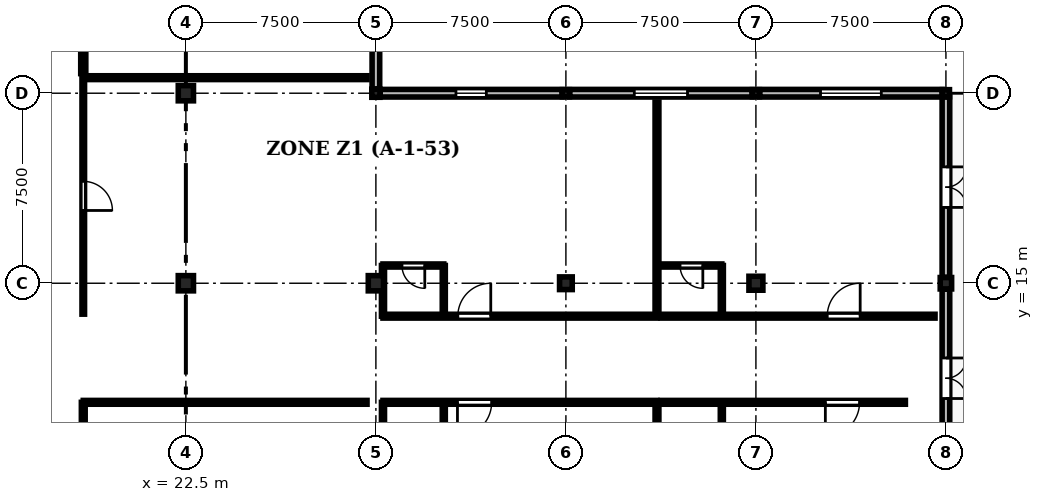
"""IFC4 building model, lengths in metres.
Left out: names, types, materials, properties, quantities, classifications, styles, units other than length and angle.
Written with IfcOpenShell. Run it as: python <this file> out.ifc"""

import sys

from ifc_helpers import new_model, si_unit, direction, frame, frame_2d, origin, origin_2d, place, context, subcontext, project, spatial, rectangle, circle, extrude, element, fill, save


model = new_model("IFC4")
c1 = context("Model", 3, precision=1e-05, world=origin(), true_north=direction((0.0, 1.0)))
c2 = subcontext(c1, "Body", "Model", "MODEL_VIEW")
j1 = project(units=[si_unit("LENGTHUNIT", "METRE"), si_unit("PLANEANGLEUNIT", "RADIAN")], contexts=[c1])
p1 = place(None, origin())
s1 = spatial("IfcSite", under=j1, at=p1, CompositionType="ELEMENT")
p2 = place(p1, origin())
s2 = spatial("IfcBuilding", under=s1, at=p2, CompositionType="ELEMENT")
p3 = place(p2, frame((0.0, 0.0, 21.9)))
s3 = spatial("IfcBuildingStorey", under=s2, at=p3, CompositionType="ELEMENT", Elevation=21.9)
p4 = place(p3, frame((22.5, 15.0, 0.0), z_axis=(0.0, 0.0, 1.0), x_axis=(1.0, 0.0, 0.0)))
e1 = element("IfcColumn", 1, at=p4, inside=s3, PredefinedType="COLUMN", context=c2, shape_type="SweptSolid", body=[
    extrude(rectangle(XDim=0.6, YDim=0.6, at=origin_2d()), origin(), (0.0, 0.0, 1.0), 4.05),
])
for number, where, z_axis, x_axis in (
    (2, (22.5, 22.5, 0.0), (0.0, 0.0, 1.0), (1.0, 0.0, 0.0)),
    (3, (30.0, 15.0, 0.0), (0.0, 0.0, 1.0), (1.0, 0.0, 0.0)),
):
    element("IfcColumn", number, at=place(p3, frame(where, z_axis=z_axis, x_axis=x_axis)), inside=s3, PredefinedType="COLUMN", context=c2, shape_type="SweptSolid", body=[
        extrude(circle(Radius=0.3, at=origin_2d()), origin(), (0.0, 0.0, 1.0), 4.05),
    ])
p5 = place(p3, frame((30.0, 22.5, 0.0), z_axis=(0.0, 0.0, 1.0), x_axis=(1.0, 0.0, 0.0)))
e4 = element("IfcColumn", 4, at=p5, inside=s3, PredefinedType="COLUMN", context=c2, shape_type="SweptSolid", body=[
    extrude(rectangle(XDim=0.32, YDim=0.32, at=origin_2d()), origin(), (0.0, 0.0, 1.0), 4.05),
])
p6 = place(p3, frame((37.5, 15.0, 0.0), z_axis=(0.0, 0.0, 1.0), x_axis=(1.0, 0.0, 0.0)))
e5 = element("IfcColumn", 5, at=p6, inside=s3, PredefinedType="COLUMN", context=c2, shape_type="SweptSolid", body=[
    extrude(rectangle(XDim=0.5, YDim=0.5, at=origin_2d()), origin(), (0.0, 0.0, 1.0), 4.05),
])
p7 = place(p3, frame((37.5, 22.5, 0.0), z_axis=(0.0, 0.0, 1.0), x_axis=(1.0, 0.0, 0.0)))
e6 = element("IfcColumn", 6, at=p7, inside=s3, PredefinedType="COLUMN", context=c2, shape_type="SweptSolid", body=[
    extrude(rectangle(XDim=0.28, YDim=0.28, at=origin_2d()), origin(), (0.0, 0.0, 1.0), 4.05),
])
p8 = place(p3, frame((45.0, 15.0, 0.0), z_axis=(0.0, 0.0, 1.0), x_axis=(1.0, 0.0, 0.0)))
e7 = element("IfcColumn", 7, at=p8, inside=s3, PredefinedType="COLUMN", context=c2, shape_type="SweptSolid", body=[
    extrude(rectangle(XDim=0.55, YDim=0.55, at=origin_2d()), origin(), (0.0, 0.0, 1.0), 4.05),
])
p9 = place(p3, frame((45.0, 22.5, 0.0), z_axis=(0.0, 0.0, 1.0), x_axis=(1.0, 0.0, 0.0)))
e8 = element("IfcColumn", 8, at=p9, inside=s3, PredefinedType="COLUMN", context=c2, shape_type="SweptSolid", body=[
    extrude(rectangle(XDim=0.28, YDim=0.28, at=origin_2d()), origin(), (0.0, 0.0, 1.0), 4.05),
])
p10 = place(p3, frame((52.5, 15.0, 0.0), z_axis=(0.0, 0.0, 1.0), x_axis=(1.0, 0.0, 0.0)))
e9 = element("IfcColumn", 9, at=p10, inside=s3, PredefinedType="COLUMN", context=c2, shape_type="SweptSolid", body=[
    extrude(rectangle(XDim=0.45, YDim=0.45, at=origin_2d()), origin(), (0.0, 0.0, 1.0), 4.05),
])
p11 = place(p3, frame((52.5, 22.5, 0.0), z_axis=(0.0, 0.0, 1.0), x_axis=(1.0, 0.0, 0.0)))
e10 = element("IfcColumn", 10, at=p11, inside=s3, PredefinedType="COLUMN", context=c2, shape_type="SweptSolid", body=[
    extrude(rectangle(XDim=0.28, YDim=0.28, at=origin_2d()), origin(), (0.0, 0.0, 1.0), 4.05),
])
p12 = place(p3, frame((30.0, 31.33, 0.0), z_axis=(0.0, 0.0, 1.0), x_axis=(0.0, -1.0, 0.0)))
e11 = element("IfcWall", 11, at=p12, inside=s3, PredefinedType="STANDARD", context=c2, shape_type="SweptSolid", body=[
    extrude(rectangle(XDim=8.66, YDim=0.3, at=frame_2d((4.33, 0.0))), origin(), (0.0, 0.0, 1.0), 3.22),
])
p13 = place(p12, frame((3.73, 0.0, 0.9)))
e12 = element("IfcOpeningElement", 12, at=p13, cuts=e11, PredefinedType="OPENING", context=c2, shape_type="SweptSolid", body=[
    extrude(rectangle(XDim=1.2, YDim=2.04, at=frame_2d((0.6, 1.02))), frame((0.0, 0.16, 0.0), z_axis=(0.0, -1.0, 0.0), x_axis=(1.0, 0.0, 0.0)), (0.0, 0.0, 1.0), 0.32),
])
p14 = place(p3, frame((30.17, 22.5, 0.0), z_axis=(0.0, 0.0, 1.0), x_axis=(1.0, 0.0, 0.0)))
e13 = element("IfcWall", 13, at=p14, inside=s3, PredefinedType="STANDARD", context=c2, shape_type="SweptSolid", body=[
    extrude(rectangle(XDim=7.18, YDim=0.3, at=frame_2d((3.59, 0.0))), origin(), (0.0, 0.0, 1.0), 3.17),
])
p15 = place(p14, frame((2.99, 0.0, 0.9)))
e14 = element("IfcOpeningElement", 14, at=p15, cuts=e13, PredefinedType="OPENING", context=c2, shape_type="SweptSolid", body=[
    extrude(rectangle(XDim=1.2, YDim=1.99, at=frame_2d((0.6, 0.995))), frame((0.0, 0.16, 0.0), z_axis=(0.0, -1.0, 0.0), x_axis=(1.0, 0.0, 0.0)), (0.0, 0.0, 1.0), 0.32),
])
p16 = place(p3, frame((37.65, 22.5, 0.0), z_axis=(0.0, 0.0, 1.0), x_axis=(1.0, 0.0, 0.0)))
e15 = element("IfcWall", 15, at=p16, inside=s3, PredefinedType="STANDARD", context=c2, shape_type="SweptSolid", body=[
    extrude(rectangle(XDim=7.2, YDim=0.3, at=frame_2d((3.6, 0.0))), origin(), (0.0, 0.0, 1.0), 3.17),
])
p17 = place(p16, frame((2.55, 0.0, 0.9)))
e16 = element("IfcOpeningElement", 16, at=p17, cuts=e15, PredefinedType="OPENING", context=c2, shape_type="SweptSolid", body=[
    extrude(rectangle(XDim=2.1, YDim=1.99, at=frame_2d((1.05, 0.995))), frame((0.0, 0.16, 0.0), z_axis=(0.0, -1.0, 0.0), x_axis=(1.0, 0.0, 0.0)), (0.0, 0.0, 1.0), 0.32),
])
p18 = place(p3, frame((52.5, 14.765, 0.0), z_axis=(0.0, 0.0, 1.0), x_axis=(0.0, -1.0, 0.0)))
e17 = element("IfcWall", 17, at=p18, inside=s3, PredefinedType="STANDARD", context=c2, shape_type="SweptSolid", body=[
    extrude(rectangle(XDim=7.03, YDim=0.3, at=frame_2d((3.515, 0.0))), origin(), (0.0, 0.0, 1.0), 3.17),
])
p19 = place(p18, frame((2.715, 0.0, 0.0)))
e18 = element("IfcOpeningElement", 18, at=p19, cuts=e17, PredefinedType="OPENING", context=c2, shape_type="SweptSolid", body=[
    extrude(rectangle(XDim=1.6, YDim=2.35, at=frame_2d((0.8, 1.175))), frame((0.0, 0.16, 0.0), z_axis=(0.0, -1.0, 0.0), x_axis=(1.0, 0.0, 0.0)), (0.0, 0.0, 1.0), 0.32),
])
p20 = place(p3, frame((45.15, 22.5, 0.0), z_axis=(0.0, 0.0, 1.0), x_axis=(1.0, 0.0, 0.0)))
e19 = element("IfcWall", 19, at=p20, inside=s3, PredefinedType="STANDARD", context=c2, shape_type="SweptSolid", body=[
    extrude(rectangle(XDim=7.2, YDim=0.3, at=frame_2d((3.6, 0.0))), origin(), (0.0, 0.0, 1.0), 3.17),
])
p21 = place(p20, frame((2.4, 0.0, 0.9)))
e20 = element("IfcOpeningElement", 20, at=p21, cuts=e19, PredefinedType="OPENING", context=c2, shape_type="SweptSolid", body=[
    extrude(rectangle(XDim=2.4, YDim=1.99, at=frame_2d((1.2, 0.995))), frame((0.0, 0.16, 0.0), z_axis=(0.0, -1.0, 0.0), x_axis=(1.0, 0.0, 0.0)), (0.0, 0.0, 1.0), 0.32),
])
p22 = place(p3, frame((52.5, 22.35, 0.0), z_axis=(0.0, 0.0, 1.0), x_axis=(0.0, -1.0, 0.0)))
e21 = element("IfcWall", 21, at=p22, inside=s3, PredefinedType="STANDARD", context=c2, shape_type="SweptSolid", body=[
    extrude(rectangle(XDim=7.115, YDim=0.3, at=frame_2d((3.558, 0.0))), origin(), (0.0, 0.0, 1.0), 3.17),
])
p23 = place(p22, frame((2.758, 0.0, 0.0)))
e22 = element("IfcOpeningElement", 22, at=p23, cuts=e21, PredefinedType="OPENING", context=c2, shape_type="SweptSolid", body=[
    extrude(rectangle(XDim=1.6, YDim=2.35, at=frame_2d((0.8, 1.175))), frame((0.0, 0.16, 0.0), z_axis=(0.0, -1.0, 0.0), x_axis=(1.0, 0.0, 0.0)), (0.0, 0.0, 1.0), 0.32),
])
p24 = place(p3, frame((18.45, 10.3, 0.0), z_axis=(0.0, 0.0, 1.0), x_axis=(0.0, -1.0, 0.0)))
e23 = element("IfcWall", 23, at=p24, inside=s3, PredefinedType="PARTITIONING", context=c2, shape_type="SweptSolid", body=[
    extrude(rectangle(XDim=9.95, YDim=0.15, at=frame_2d((4.975, 0.0))), origin(), (0.0, 0.0, 1.0), 3.755),
])
p25 = place(p24, frame((5.92, 0.0, 0.0)))
e24 = element("IfcOpeningElement", 24, at=p25, cuts=e23, PredefinedType="OPENING", context=c2, shape_type="SweptSolid", body=[
    extrude(rectangle(XDim=1.35, YDim=2.25, at=frame_2d((0.675, 1.125))), frame((0.0, 0.085, 0.0), z_axis=(0.0, -1.0, 0.0), x_axis=(1.0, 0.0, 0.0)), (0.0, 0.0, 1.0), 0.17),
])
p26 = place(p3, frame((18.45, 23.114, 0.0), z_axis=(0.0, 0.0, 1.0), x_axis=(0.0, -1.0, 0.0)))
e25 = element("IfcWall", 25, at=p26, inside=s3, PredefinedType="PARTITIONING", context=c2, shape_type="SweptSolid", body=[
    extrude(rectangle(XDim=9.334, YDim=0.1, at=frame_2d((4.667, 0.0))), origin(), (0.0, 0.0, 1.0), 3.355),
])
p27 = place(p26, frame((4.092, 0.0, 0.0)))
e26 = element("IfcOpeningElement", 26, at=p27, cuts=e25, PredefinedType="OPENING", context=c2, shape_type="SweptSolid", body=[
    extrude(rectangle(XDim=1.15, YDim=2.2, at=frame_2d((0.575, 1.1))), frame((0.0, 0.06, 0.0), z_axis=(0.0, -1.0, 0.0), x_axis=(1.0, 0.0, 0.0)), (0.0, 0.0, 1.0), 0.12),
])
p28 = place(p3, frame((18.45, 32.607, 0.0), z_axis=(0.0, 0.0, 1.0), x_axis=(0.0, -1.0, 0.0)))
e27 = element("IfcWall", 27, at=p28, inside=s3, PredefinedType="STANDARD", context=c2, shape_type="SweptSolid", body=[
    extrude(rectangle(XDim=9.334, YDim=0.2, at=frame_2d((4.667, 0.0))), origin(), (0.0, 0.0, 1.0), 3.355),
])
p29 = place(p28, frame((4.86, 0.0, 0.0)))
e28 = element("IfcOpeningElement", 28, at=p29, cuts=e27, PredefinedType="OPENING", context=c2, shape_type="SweptSolid", body=[
    extrude(rectangle(XDim=1.15, YDim=2.2, at=frame_2d((0.575, 1.1))), frame((0.0, 0.11, 0.0), z_axis=(0.0, -1.0, 0.0), x_axis=(1.0, 0.0, 0.0)), (0.0, 0.0, 1.0), 0.22),
])
p30 = place(p3, frame((41.095, 10.3, 0.0), z_axis=(0.0, 0.0, 1.0), x_axis=(-1.0, 0.0, 0.0)))
e29 = element("IfcWall", 29, at=p30, inside=s3, PredefinedType="PARTITIONING", context=c2, shape_type="SweptSolid", body=[
    extrude(rectangle(XDim=10.815, YDim=0.15, at=frame_2d((5.407, 0.0))), origin(), (0.0, 0.0, 1.0), 3.755),
])
p31 = place(p30, frame((6.525, 0.0, 0.0)))
e30 = element("IfcOpeningElement", 30, at=p31, cuts=e29, PredefinedType="OPENING", context=c2, shape_type="SweptSolid", body=[
    extrude(rectangle(XDim=1.35, YDim=2.25, at=frame_2d((0.675, 1.125))), frame((0.0, 0.085, 0.0), z_axis=(0.0, -1.0, 0.0), x_axis=(1.0, 0.0, 0.0)), (0.0, 0.0, 1.0), 0.17),
])
p32 = place(p3, frame((32.68, 8.3, 0.0), z_axis=(0.0, 0.0, 1.0), x_axis=(0.0, 1.0, 0.0)))
e31 = element("IfcWall", 31, at=p32, inside=s3, PredefinedType="PARTITIONING", context=c2, shape_type="SweptSolid", body=[
    extrude(rectangle(XDim=2.0, YDim=0.12, at=frame_2d((1.0, 0.0))), origin(), (0.0, 0.0, 1.0), 3.755),
])
p33 = place(p3, frame((30.28, 13.7, 0.0), z_axis=(0.0, 0.0, 1.0), x_axis=(1.0, 0.0, 0.0)))
e32 = element("IfcWall", 32, at=p33, inside=s3, PredefinedType="PARTITIONING", context=c2, shape_type="SweptSolid", body=[
    extrude(rectangle(XDim=10.815, YDim=0.15, at=frame_2d((5.407, 0.0))), origin(), (0.0, 0.0, 1.0), 3.755),
])
p34 = place(p33, frame((2.955, 0.0, 0.0)))
e33 = element("IfcOpeningElement", 33, at=p34, cuts=e32, PredefinedType="OPENING", context=c2, shape_type="SweptSolid", body=[
    extrude(rectangle(XDim=1.3, YDim=2.2, at=frame_2d((0.65, 1.1))), frame((0.0, 0.085, 0.0), z_axis=(0.0, -1.0, 0.0), x_axis=(1.0, 0.0, 0.0)), (0.0, 0.0, 1.0), 0.17),
])
p35 = place(p3, frame((32.68, 15.7, 0.0), z_axis=(0.0, 0.0, 1.0), x_axis=(-1.0, 0.0, 0.0)))
e34 = element("IfcWall", 34, at=p35, inside=s3, PredefinedType="PARTITIONING", context=c2, shape_type="SweptSolid", body=[
    extrude(rectangle(XDim=2.4, YDim=0.12, at=frame_2d((1.2, 0.0))), origin(), (0.0, 0.0, 1.0), 3.755),
])
p36 = place(p35, frame((0.75, 0.0, 0.0)))
e35 = element("IfcOpeningElement", 35, at=p36, cuts=e34, PredefinedType="OPENING", context=c2, shape_type="SweptSolid", body=[
    extrude(rectangle(XDim=0.9, YDim=2.1, at=frame_2d((0.45, 1.05))), frame((0.0, 0.07, 0.0), z_axis=(0.0, -1.0, 0.0), x_axis=(1.0, 0.0, 0.0)), (0.0, 0.0, 1.0), 0.14),
])
p37 = place(p3, frame((32.68, 13.7, 0.0), z_axis=(0.0, 0.0, 1.0), x_axis=(0.0, 1.0, 0.0)))
e36 = element("IfcWall", 36, at=p37, inside=s3, PredefinedType="PARTITIONING", context=c2, shape_type="SweptSolid", body=[
    extrude(rectangle(XDim=2.0, YDim=0.12, at=frame_2d((1.0, 0.0))), origin(), (0.0, 0.0, 1.0), 3.755),
])
p38 = place(p3, frame((50.9, 10.3, 0.0), z_axis=(0.0, 0.0, 1.0), x_axis=(-1.0, 0.0, 0.0)))
e37 = element("IfcWall", 37, at=p38, inside=s3, PredefinedType="PARTITIONING", context=c2, shape_type="SweptSolid", body=[
    extrude(rectangle(XDim=9.645, YDim=0.15, at=frame_2d((4.823, 0.0))), origin(), (0.0, 0.0, 1.0), 3.755),
])
p39 = place(p38, frame((1.809, 0.0, 0.0)))
e38 = element("IfcOpeningElement", 38, at=p39, cuts=e37, PredefinedType="OPENING", context=c2, shape_type="SweptSolid", body=[
    extrude(rectangle(XDim=1.35, YDim=2.25, at=frame_2d((0.675, 1.125))), frame((0.0, 0.085, 0.0), z_axis=(0.0, -1.0, 0.0), x_axis=(1.0, 0.0, 0.0)), (0.0, 0.0, 1.0), 0.17),
])
p40 = place(p3, frame((43.655, 8.3, 0.0), z_axis=(0.0, 0.0, 1.0), x_axis=(0.0, 1.0, 0.0)))
e39 = element("IfcWall", 39, at=p40, inside=s3, PredefinedType="PARTITIONING", context=c2, shape_type="SweptSolid", body=[
    extrude(rectangle(XDim=2.0, YDim=0.12, at=frame_2d((1.0, 0.0))), origin(), (0.0, 0.0, 1.0), 3.755),
])
p41 = place(p3, frame((41.255, 13.7, 0.0), z_axis=(0.0, 0.0, 1.0), x_axis=(1.0, 0.0, 0.0)))
e40 = element("IfcWall", 40, at=p41, inside=s3, PredefinedType="PARTITIONING", context=c2, shape_type="SweptSolid", body=[
    extrude(rectangle(XDim=10.815, YDim=0.15, at=frame_2d((5.408, 0.0))), origin(), (0.0, 0.0, 1.0), 3.755),
])
p42 = place(p41, frame((6.561, 0.0, 0.0)))
e41 = element("IfcOpeningElement", 41, at=p42, cuts=e40, PredefinedType="OPENING", context=c2, shape_type="SweptSolid", body=[
    extrude(rectangle(XDim=1.3, YDim=2.2, at=frame_2d((0.65, 1.1))), frame((0.0, 0.085, 0.0), z_axis=(0.0, -1.0, 0.0), x_axis=(1.0, 0.0, 0.0)), (0.0, 0.0, 1.0), 0.17),
])
p43 = place(p3, frame((43.655, 15.7, 0.0), z_axis=(0.0, 0.0, 1.0), x_axis=(-1.0, 0.0, 0.0)))
e42 = element("IfcWall", 42, at=p43, inside=s3, PredefinedType="PARTITIONING", context=c2, shape_type="SweptSolid", body=[
    extrude(rectangle(XDim=2.4, YDim=0.12, at=frame_2d((1.2, 0.0))), origin(), (0.0, 0.0, 1.0), 3.755),
])
p44 = place(p43, frame((0.75, 0.0, 0.0)))
e43 = element("IfcOpeningElement", 43, at=p44, cuts=e42, PredefinedType="OPENING", context=c2, shape_type="SweptSolid", body=[
    extrude(rectangle(XDim=0.9, YDim=2.1, at=frame_2d((0.45, 1.05))), frame((0.0, 0.07, 0.0), z_axis=(0.0, -1.0, 0.0), x_axis=(1.0, 0.0, 0.0)), (0.0, 0.0, 1.0), 0.14),
])
p45 = place(p3, frame((43.655, 13.7, 0.0), z_axis=(0.0, 0.0, 1.0), x_axis=(0.0, 1.0, 0.0)))
e44 = element("IfcWall", 44, at=p45, inside=s3, PredefinedType="PARTITIONING", context=c2, shape_type="SweptSolid", body=[
    extrude(rectangle(XDim=2.0, YDim=0.12, at=frame_2d((1.0, 0.0))), origin(), (0.0, 0.0, 1.0), 3.755),
])
for number, where, z_axis, x_axis in (
    (45, (18.45, 10.3, 0.0), (0.0, 0.0, 1.0), (1.0, 0.0, 0.0)),
    (46, (18.45, 23.114, 0.0), (0.0, 0.0, 1.0), (1.0, 0.0, 0.0)),
):
    element("IfcWall", number, at=place(p3, frame(where, z_axis=z_axis, x_axis=x_axis)), inside=s3, PredefinedType="PARTITIONING", context=c2, shape_type="SweptSolid", body=[
        extrude(rectangle(XDim=11.2, YDim=0.15, at=frame_2d((5.6, 0.0))), origin(), (0.0, 0.0, 1.0), 3.755),
    ])
p46 = place(p3, frame((41.095, 0.35, 0.0), z_axis=(0.0, 0.0, 1.0), x_axis=(0.0, 1.0, 0.0)))
e47 = element("IfcWall", 47, at=p46, inside=s3, PredefinedType="PARTITIONING", context=c2, shape_type="SweptSolid", body=[
    extrude(rectangle(XDim=9.95, YDim=0.15, at=frame_2d((4.975, 0.0))), origin(), (0.0, 0.0, 1.0), 3.755),
])
p47 = place(p3, frame((41.095, 13.7, 0.0), z_axis=(0.0, 0.0, 1.0), x_axis=(0.0, 1.0, 0.0)))
e48 = element("IfcWall", 48, at=p47, inside=s3, PredefinedType="PARTITIONING", context=c2, shape_type="SweptSolid", body=[
    extrude(rectangle(XDim=8.45, YDim=0.15, at=frame_2d((4.225, 0.0))), origin(), (0.0, 0.0, 1.0), 3.755),
])
p48 = place(p3, frame((30.28, 8.3, 0.0), z_axis=(0.0, 0.0, 1.0), x_axis=(0.0, 1.0, 0.0)))
e49 = element("IfcWall", 49, at=p48, inside=s3, PredefinedType="PARTITIONING", context=c2, shape_type="SweptSolid", body=[
    extrude(rectangle(XDim=2.0, YDim=0.12, at=frame_2d((1.0, 0.0))), origin(), (0.0, 0.0, 1.0), 3.255),
])
p49 = place(p3, frame((30.28, 13.7, 0.0), z_axis=(0.0, 0.0, 1.0), x_axis=(0.0, 1.0, 0.0)))
e50 = element("IfcWall", 50, at=p49, inside=s3, PredefinedType="PARTITIONING", context=c2, shape_type="SweptSolid", body=[
    extrude(rectangle(XDim=2.0, YDim=0.12, at=frame_2d((1.0, 0.0))), origin(), (0.0, 0.0, 1.0), 3.205),
])
p50 = place(p15, origin())
e51 = element("IfcWindow", 51, at=p50, inside=s3, PartitioningType="SINGLE_PANEL", PredefinedType="WINDOW", context=c2, shape_type="SweptSolid", body=[
    extrude(rectangle(XDim=1.2, YDim=1.99, at=frame_2d((0.6, 0.995))), frame((0.0, 0.03, 0.0), z_axis=(0.0, -1.0, 0.0), x_axis=(1.0, 0.0, 0.0)), (0.0, 0.0, 1.0), 0.06),
])
fill(e14, e51)
p51 = place(p17, origin())
e52 = element("IfcWindow", 52, at=p51, inside=s3, PartitioningType="SINGLE_PANEL", PredefinedType="WINDOW", context=c2, shape_type="SweptSolid", body=[
    extrude(rectangle(XDim=2.1, YDim=1.99, at=frame_2d((1.05, 0.995))), frame((0.0, 0.03, 0.0), z_axis=(0.0, -1.0, 0.0), x_axis=(1.0, 0.0, 0.0)), (0.0, 0.0, 1.0), 0.06),
])
fill(e16, e52)
p52 = place(p19, origin())
e53 = element("IfcDoor", 53, at=p52, inside=s3, OperationType="DOUBLE_DOOR_SINGLE_SWING", PredefinedType="DOOR", context=c2, shape_type="SweptSolid", body=[
    extrude(rectangle(XDim=1.6, YDim=2.35, at=frame_2d((0.8, 1.175))), frame((0.0, 0.025, 0.0), z_axis=(0.0, -1.0, 0.0), x_axis=(1.0, 0.0, 0.0)), (0.0, 0.0, 1.0), 0.05),
])
fill(e18, e53)
p53 = place(p21, origin())
e54 = element("IfcWindow", 54, at=p53, inside=s3, PartitioningType="SINGLE_PANEL", PredefinedType="WINDOW", context=c2, shape_type="SweptSolid", body=[
    extrude(rectangle(XDim=2.4, YDim=1.99, at=frame_2d((1.2, 0.995))), frame((0.0, 0.03, 0.0), z_axis=(0.0, -1.0, 0.0), x_axis=(1.0, 0.0, 0.0)), (0.0, 0.0, 1.0), 0.06),
])
fill(e20, e54)
p54 = place(p23, origin())
e55 = element("IfcDoor", 55, at=p54, inside=s3, OperationType="DOUBLE_DOOR_SINGLE_SWING", PredefinedType="DOOR", context=c2, shape_type="SweptSolid", body=[
    extrude(rectangle(XDim=1.6, YDim=2.35, at=frame_2d((0.8, 1.175))), frame((0.0, 0.025, 0.0), z_axis=(0.0, -1.0, 0.0), x_axis=(1.0, 0.0, 0.0)), (0.0, 0.0, 1.0), 0.05),
])
fill(e22, e55)
p55 = place(p27, origin())
e56 = element("IfcDoor", 56, at=p55, inside=s3, OperationType="SINGLE_SWING_RIGHT", PredefinedType="DOOR", context=c2, shape_type="SweptSolid", body=[
    extrude(rectangle(XDim=1.15, YDim=2.2, at=frame_2d((0.575, 1.1))), frame((0.0, 0.025, 0.0), z_axis=(0.0, -1.0, 0.0), x_axis=(1.0, 0.0, 0.0)), (0.0, 0.0, 1.0), 0.05),
])
fill(e26, e56)
p56 = place(p31, origin())
e57 = element("IfcDoor", 57, at=p56, inside=s3, OperationType="SINGLE_SWING_RIGHT", PredefinedType="DOOR", context=c2, shape_type="SweptSolid", body=[
    extrude(rectangle(XDim=1.35, YDim=2.25, at=frame_2d((0.675, 1.125))), frame((0.0, 0.025, 0.0), z_axis=(0.0, -1.0, 0.0), x_axis=(1.0, 0.0, 0.0)), (0.0, 0.0, 1.0), 0.05),
])
fill(e30, e57)
p57 = place(p34, origin())
e58 = element("IfcDoor", 58, at=p57, inside=s3, OperationType="SINGLE_SWING_RIGHT", PredefinedType="DOOR", context=c2, shape_type="SweptSolid", body=[
    extrude(rectangle(XDim=1.3, YDim=2.2, at=frame_2d((0.65, 1.1))), frame((0.0, 0.025, 0.0), z_axis=(0.0, -1.0, 0.0), x_axis=(1.0, 0.0, 0.0)), (0.0, 0.0, 1.0), 0.05),
])
fill(e33, e58)
p58 = place(p36, origin())
e59 = element("IfcDoor", 59, at=p58, inside=s3, OperationType="SINGLE_SWING_LEFT", PredefinedType="DOOR", context=c2, shape_type="SweptSolid", body=[
    extrude(rectangle(XDim=0.9, YDim=2.1, at=frame_2d((0.45, 1.05))), frame((0.0, 0.025, 0.0), z_axis=(0.0, -1.0, 0.0), x_axis=(1.0, 0.0, 0.0)), (0.0, 0.0, 1.0), 0.05),
])
fill(e35, e59)
p59 = place(p39, origin())
e60 = element("IfcDoor", 60, at=p59, inside=s3, OperationType="SINGLE_SWING_RIGHT", PredefinedType="DOOR", context=c2, shape_type="SweptSolid", body=[
    extrude(rectangle(XDim=1.35, YDim=2.25, at=frame_2d((0.675, 1.125))), frame((0.0, 0.025, 0.0), z_axis=(0.0, -1.0, 0.0), x_axis=(1.0, 0.0, 0.0)), (0.0, 0.0, 1.0), 0.05),
])
fill(e38, e60)
p60 = place(p42, origin())
e61 = element("IfcDoor", 61, at=p60, inside=s3, OperationType="SINGLE_SWING_RIGHT", PredefinedType="DOOR", context=c2, shape_type="SweptSolid", body=[
    extrude(rectangle(XDim=1.3, YDim=2.2, at=frame_2d((0.65, 1.1))), frame((0.0, 0.025, 0.0), z_axis=(0.0, -1.0, 0.0), x_axis=(1.0, 0.0, 0.0)), (0.0, 0.0, 1.0), 0.05),
])
fill(e41, e61)
p61 = place(p44, origin())
e62 = element("IfcDoor", 62, at=p61, inside=s3, OperationType="SINGLE_SWING_LEFT", PredefinedType="DOOR", context=c2, shape_type="SweptSolid", body=[
    extrude(rectangle(XDim=0.9, YDim=2.1, at=frame_2d((0.45, 1.05))), frame((0.0, 0.025, 0.0), z_axis=(0.0, -1.0, 0.0), x_axis=(1.0, 0.0, 0.0)), (0.0, 0.0, 1.0), 0.05),
])
fill(e43, e62)
save(model, sys.argv[1])
